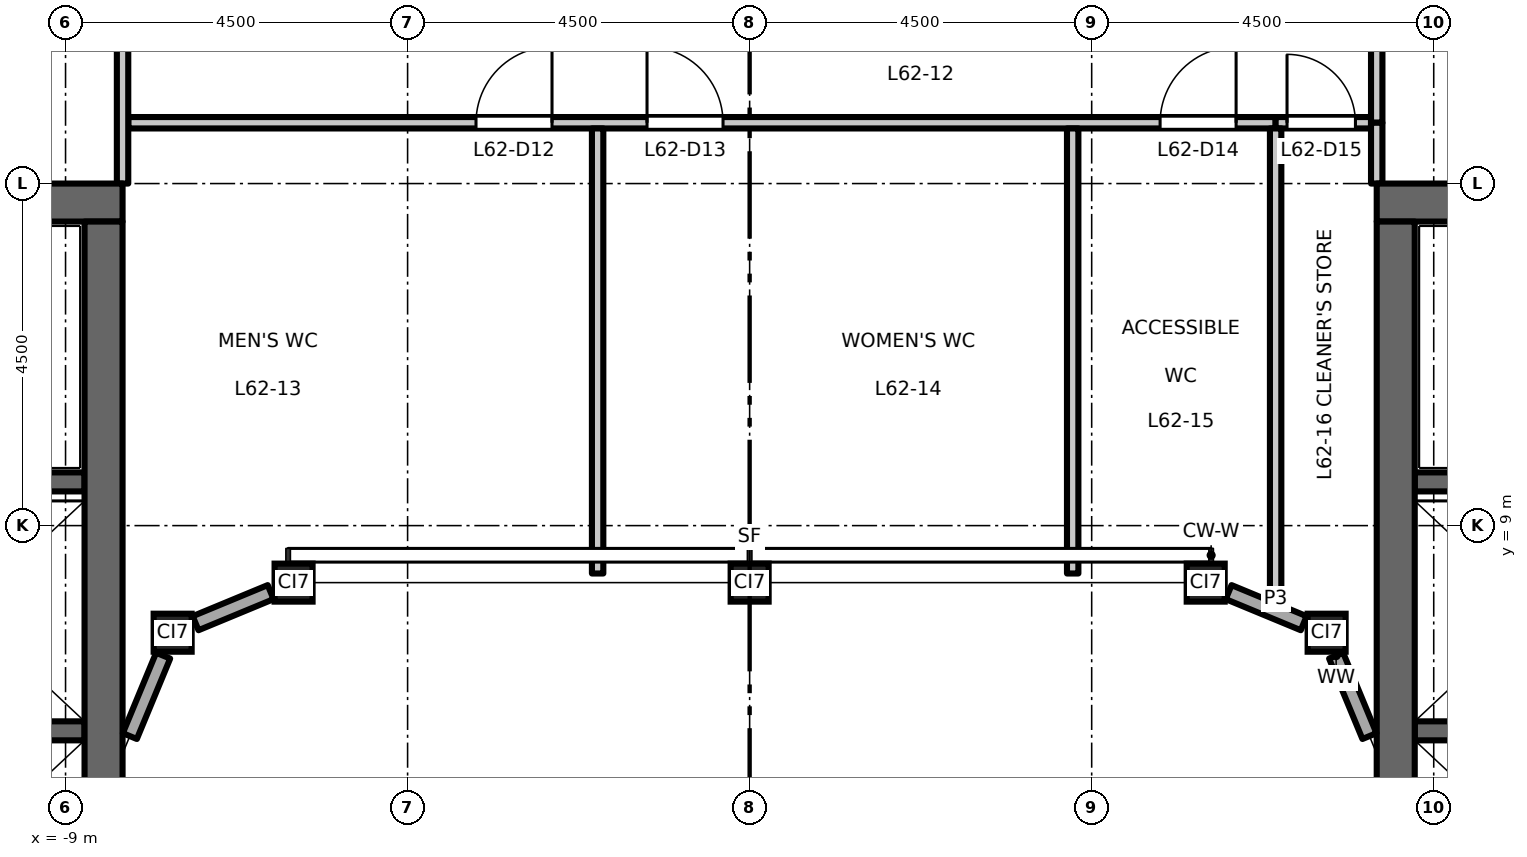
"""IFC4 building model, lengths in metres.
Left out: names, types, materials, properties, quantities, classifications, styles, units other than length and angle.
Written with IfcOpenShell. Run it as: python <this file> out.ifc"""

import sys

from ifc_helpers import new_model, si_unit, direction, frame, frame_2d, origin, origin_2d, place, context, subcontext, project, spatial, rectangle, hollow_rectangle, extrude, element, fill, save


model = new_model("IFC4")
c1 = context("Model", 3, precision=1e-05, world=origin(), true_north=direction((0.0, 1.0)))
c2 = subcontext(c1, "Body", "Model", "MODEL_VIEW")
j1 = project(units=[si_unit("LENGTHUNIT", "METRE"), si_unit("PLANEANGLEUNIT", "RADIAN")], contexts=[c1])
p1 = place(None, origin())
s1 = spatial("IfcSite", under=j1, at=p1, CompositionType="ELEMENT")
p2 = place(p1, origin())
s2 = spatial("IfcBuilding", under=s1, at=p2, CompositionType="ELEMENT")
p3 = place(p2, frame((0.0, 0.0, 289.7)))
s3 = spatial("IfcBuildingStorey", under=s2, at=p3, CompositionType="ELEMENT", Elevation=289.7)
for number, where, z_axis, x_axis in (
    (1, (-7.591, 7.591, 0.0), (0.0, 0.0, 1.0), (1.0, 0.0, 0.0)),
    (2, (-6.0, 8.25, 0.0), (0.0, 0.0, 1.0), (1.0, 0.0, 0.0)),
    (3, (0.0, 8.25, 0.0), (0.0, 0.0, 1.0), (1.0, 0.0, 0.0)),
    (4, (6.0, 8.25, 0.0), (0.0, 0.0, 1.0), (1.0, 0.0, 0.0)),
    (5, (7.591, 7.591, 0.0), (0.0, 0.0, 1.0), (1.0, 0.0, 0.0)),
):
    element("IfcColumn", number, at=place(p3, frame(where, z_axis=z_axis, x_axis=x_axis)), inside=s3, PredefinedType="COLUMN", context=c2, shape_type="SweptSolid", body=[
        extrude(hollow_rectangle(XDim=0.5, YDim=0.5, WallThickness=0.025, at=origin_2d()), origin(), (0.0, 0.0, 1.0), 4.5),
    ])
p4 = place(p3, frame((-8.75, 6.3, 0.0), z_axis=(0.0, 0.0, 1.0), x_axis=(-1.0, 0.0, 0.0)))
e6 = element("IfcWall", 6, at=p4, inside=s3, PredefinedType="SHEAR", context=c2, shape_type="SweptSolid", body=[
    extrude(rectangle(XDim=3.1, YDim=0.25, at=frame_2d((1.55, 0.0))), origin(), (0.0, 0.0, 1.0), 4.35),
])
p5 = place(p3, frame((-8.75, 9.575, 0.0), z_axis=(0.0, 0.0, 1.0), x_axis=(-1.0, 0.0, 0.0)))
e7 = element("IfcWall", 7, at=p5, inside=s3, PredefinedType="SHEAR", context=c2, shape_type="SweptSolid", body=[
    extrude(rectangle(XDim=8.0, YDim=0.25, at=frame_2d((4.0, 0.0))), origin(), (0.0, 0.0, 1.0), 4.35),
])
p6 = place(p5, frame((6.65, 0.0, 0.0)))
e8 = element("IfcOpeningElement", 8, at=p6, cuts=e7, PredefinedType="OPENING", context=c2, shape_type="SweptSolid", body=[
    extrude(rectangle(XDim=1.1, YDim=2.1, at=frame_2d((0.55, 1.05))), frame((0.0, 0.135, 0.0), z_axis=(0.0, -1.0, 0.0), x_axis=(1.0, 0.0, 0.0)), (0.0, 0.0, 1.0), 0.27),
])
p7 = place(p3, frame((-8.25, 13.25, 0.0), z_axis=(0.0, 0.0, 1.0), x_axis=(-1.0, 0.0, 0.0)))
e9 = element("IfcWall", 9, at=p7, inside=s3, PredefinedType="SHEAR", context=c2, shape_type="SweptSolid", body=[
    extrude(rectangle(XDim=9.0, YDim=0.5, at=frame_2d((4.5, 0.0))), origin(), (0.0, 0.0, 1.0), 4.35),
])
p8 = place(p3, frame((-8.5, -13.0, 0.0), z_axis=(0.0, 0.0, 1.0), x_axis=(0.0, 1.0, 0.0)))
e10 = element("IfcWall", 10, at=p8, inside=s3, PredefinedType="SHEAR", context=c2, shape_type="SweptSolid", body=[
    extrude(rectangle(XDim=26.0, YDim=0.5, at=frame_2d((13.0, 0.0))), origin(), (0.0, 0.0, 1.0), 4.35),
])
p9 = place(p3, frame((8.75, 6.3, 0.0), z_axis=(0.0, 0.0, 1.0), x_axis=(1.0, 0.0, 0.0)))
e11 = element("IfcWall", 11, at=p9, inside=s3, PredefinedType="SHEAR", context=c2, shape_type="SweptSolid", body=[
    extrude(rectangle(XDim=3.1, YDim=0.25, at=frame_2d((1.55, 0.0))), origin(), (0.0, 0.0, 1.0), 4.35),
])
p10 = place(p3, frame((8.75, 9.575, 0.0), z_axis=(0.0, 0.0, 1.0), x_axis=(1.0, 0.0, 0.0)))
e12 = element("IfcWall", 12, at=p10, inside=s3, PredefinedType="SHEAR", context=c2, shape_type="SweptSolid", body=[
    extrude(rectangle(XDim=8.0, YDim=0.25, at=frame_2d((4.0, 0.0))), origin(), (0.0, 0.0, 1.0), 4.35),
])
p11 = place(p10, frame((6.65, 0.0, 0.0)))
e13 = element("IfcOpeningElement", 13, at=p11, cuts=e12, PredefinedType="OPENING", context=c2, shape_type="SweptSolid", body=[
    extrude(rectangle(XDim=1.1, YDim=2.1, at=frame_2d((0.55, 1.05))), frame((0.0, 0.135, 0.0), z_axis=(0.0, -1.0, 0.0), x_axis=(1.0, 0.0, 0.0)), (0.0, 0.0, 1.0), 0.27),
])
p12 = place(p3, frame((8.25, 13.25, 0.0), z_axis=(0.0, 0.0, 1.0), x_axis=(1.0, 0.0, 0.0)))
e14 = element("IfcWall", 14, at=p12, inside=s3, PredefinedType="SHEAR", context=c2, shape_type="SweptSolid", body=[
    extrude(rectangle(XDim=9.0, YDim=0.5, at=frame_2d((4.5, 0.0))), origin(), (0.0, 0.0, 1.0), 4.35),
])
p13 = place(p3, frame((8.5, -13.0, 0.0), z_axis=(0.0, 0.0, 1.0), x_axis=(0.0, 1.0, 0.0)))
e15 = element("IfcWall", 15, at=p13, inside=s3, PredefinedType="SHEAR", context=c2, shape_type="SweptSolid", body=[
    extrude(rectangle(XDim=26.0, YDim=0.5, at=frame_2d((13.0, 0.0))), origin(), (0.0, 0.0, 1.0), 4.35),
])
p14 = place(p3, frame((8.154, 6.231, 0.0), z_axis=(0.0, 0.0, 1.0), x_axis=(-0.382571404949, 0.923925927829, 0.0)))
e16 = element("IfcWall", 16, at=p14, inside=s3, PredefinedType="STANDARD", context=c2, shape_type="SweptSolid", body=[
    extrude(rectangle(XDim=1.146, YDim=0.2, at=frame_2d((0.573, 0.0))), origin(), (0.0, 0.0, 1.0), 4.01),
])
for number, where, z_axis, x_axis in (
    (17, (7.289, 7.716, 0.0), (0.0, 0.0, 1.0), (-0.924, 0.383, 0.0)),
    (18, (-6.302, 8.125, 0.0), (0.0, 0.0, 1.0), (-0.924, -0.383, 0.0)),
):
    element("IfcWall", number, at=place(p3, frame(where, z_axis=z_axis, x_axis=x_axis)), inside=s3, PredefinedType="STANDARD", context=c2, shape_type="SweptSolid", body=[
        extrude(rectangle(XDim=1.069, YDim=0.2, at=frame_2d((0.534, 0.0))), origin(), (0.0, 0.0, 1.0), 4.01),
    ])
p15 = place(p3, frame((-7.716, 7.289, 0.0), z_axis=(0.0, 0.0, 1.0), x_axis=(-0.382571404949, -0.923925927829, 0.0)))
e19 = element("IfcWall", 19, at=p15, inside=s3, PredefinedType="STANDARD", context=c2, shape_type="SweptSolid", body=[
    extrude(rectangle(XDim=1.146, YDim=0.2, at=frame_2d((0.573, 0.0))), origin(), (0.0, 0.0, 1.0), 4.01),
])
p16 = place(p3, frame((-8.175, 14.3, 0.0), z_axis=(0.0, 0.0, 1.0), x_axis=(1.0, 0.0, 0.0)))
e20 = element("IfcWall", 20, at=p16, inside=s3, PredefinedType="PARTITIONING", context=c2, shape_type="SweptSolid", body=[
    extrude(rectangle(XDim=15.095, YDim=0.15, at=frame_2d((7.547, 0.0))), origin(), (0.0, 0.0, 1.0), 4.35),
])
p17 = place(p16, frame((4.575, 0.0, 0.0)))
e21 = element("IfcOpeningElement", 21, at=p17, cuts=e20, PredefinedType="OPENING", context=c2, shape_type="SweptSolid", body=[
    extrude(rectangle(XDim=1.0, YDim=2.1, at=frame_2d((0.5, 1.05))), frame((0.0, 0.085, 0.0), z_axis=(0.0, -1.0, 0.0), x_axis=(1.0, 0.0, 0.0)), (0.0, 0.0, 1.0), 0.17),
])
p18 = place(p16, frame((6.825, 0.0, 0.0)))
e22 = element("IfcOpeningElement", 22, at=p18, cuts=e20, PredefinedType="OPENING", context=c2, shape_type="SweptSolid", body=[
    extrude(rectangle(XDim=1.0, YDim=2.1, at=frame_2d((0.5, 1.05))), frame((0.0, 0.085, 0.0), z_axis=(0.0, -1.0, 0.0), x_axis=(1.0, 0.0, 0.0)), (0.0, 0.0, 1.0), 0.17),
])
p19 = place(p16, frame((13.575, 0.0, 0.0)))
e23 = element("IfcOpeningElement", 23, at=p19, cuts=e20, PredefinedType="OPENING", context=c2, shape_type="SweptSolid", body=[
    extrude(rectangle(XDim=1.0, YDim=2.1, at=frame_2d((0.5, 1.05))), frame((0.0, 0.085, 0.0), z_axis=(0.0, -1.0, 0.0), x_axis=(1.0, 0.0, 0.0)), (0.0, 0.0, 1.0), 0.17),
])
p20 = place(p3, frame((6.92, 14.3, 0.0), z_axis=(0.0, 0.0, 1.0), x_axis=(1.0, 0.0, 0.0)))
e24 = element("IfcWall", 24, at=p20, inside=s3, PredefinedType="PARTITIONING", context=c2, shape_type="SweptSolid", body=[
    extrude(rectangle(XDim=1.255, YDim=0.15, at=frame_2d((0.627, 0.0))), origin(), (0.0, 0.0, 1.0), 4.35),
])
p21 = place(p20, frame((0.15, 0.0, 0.0)))
e25 = element("IfcOpeningElement", 25, at=p21, cuts=e24, PredefinedType="OPENING", context=c2, shape_type="SweptSolid", body=[
    extrude(rectangle(XDim=0.9, YDim=2.1, at=frame_2d((0.45, 1.05))), frame((0.0, 0.085, 0.0), z_axis=(0.0, -1.0, 0.0), x_axis=(1.0, 0.0, 0.0)), (0.0, 0.0, 1.0), 0.17),
])
p22 = place(p3, frame((-8.25, 13.5, 0.0), z_axis=(0.0, 0.0, 1.0), x_axis=(0.0, 1.0, 0.0)))
e26 = element("IfcWall", 26, at=p22, inside=s3, PredefinedType="PARTITIONING", context=c2, shape_type="SweptSolid", body=[
    extrude(rectangle(XDim=2.925, YDim=0.15, at=frame_2d((1.462, 0.0))), origin(), (0.0, 0.0, 1.0), 4.35),
])
for number, where, z_axis, x_axis in (
    (27, (-2.0, 8.37, 0.0), (0.0, 0.0, 1.0), (0.0, 1.0, 0.0)),
    (28, (4.25, 8.37, 0.0), (0.0, 0.0, 1.0), (0.0, 1.0, 0.0)),
):
    element("IfcWall", number, at=place(p3, frame(where, z_axis=z_axis, x_axis=x_axis)), inside=s3, PredefinedType="PARTITIONING", context=c2, shape_type="SweptSolid", body=[
        extrude(rectangle(XDim=5.855, YDim=0.15, at=frame_2d((2.927, 0.0))), origin(), (0.0, 0.0, 1.0), 4.35),
    ])
p23 = place(p3, frame((6.92, 8.029, 0.0), z_axis=(0.0, 0.0, 1.0), x_axis=(0.0, 1.0, 0.0)))
e29 = element("IfcWall", 29, at=p23, inside=s3, PredefinedType="PARTITIONING", context=c2, shape_type="SweptSolid", body=[
    extrude(rectangle(XDim=6.196, YDim=0.15, at=frame_2d((3.098, 0.0))), origin(), (0.0, 0.0, 1.0), 4.35),
])
p24 = place(p3, frame((8.25, 14.3, 0.0), z_axis=(0.0, 0.0, 1.0), x_axis=(0.0, 1.0, 0.0)))
e30 = element("IfcWall", 30, at=p24, inside=s3, PredefinedType="PARTITIONING", context=c2, shape_type="SweptSolid", body=[
    extrude(rectangle(XDim=2.125, YDim=0.15, at=frame_2d((1.062, 0.0))), origin(), (0.0, 0.0, 1.0), 4.35),
])
p25 = place(p3, frame((8.25, 13.5, 0.0), z_axis=(0.0, 0.0, 1.0), x_axis=(0.0, 1.0, 0.0)))
e31 = element("IfcWall", 31, at=p25, inside=s3, PredefinedType="PARTITIONING", context=c2, shape_type="SweptSolid", body=[
    extrude(rectangle(XDim=0.8, YDim=0.15, at=frame_2d((0.4, 0.0))), origin(), (0.0, 0.0, 1.0), 4.35),
])
p26 = place(p17, origin())
e32 = element("IfcDoor", 32, at=p26, inside=s3, OperationType="SINGLE_SWING_RIGHT", PredefinedType="DOOR", context=c2, shape_type="SweptSolid", body=[
    extrude(rectangle(XDim=1.0, YDim=2.1, at=frame_2d((0.5, 1.05))), frame((0.0, 0.025, 0.0), z_axis=(0.0, -1.0, 0.0), x_axis=(1.0, 0.0, 0.0)), (0.0, 0.0, 1.0), 0.05),
])
fill(e21, e32)
p27 = place(p18, origin())
e33 = element("IfcDoor", 33, at=p27, inside=s3, OperationType="SINGLE_SWING_LEFT", PredefinedType="DOOR", context=c2, shape_type="SweptSolid", body=[
    extrude(rectangle(XDim=1.0, YDim=2.1, at=frame_2d((0.5, 1.05))), frame((0.0, 0.025, 0.0), z_axis=(0.0, -1.0, 0.0), x_axis=(1.0, 0.0, 0.0)), (0.0, 0.0, 1.0), 0.05),
])
fill(e22, e33)
p28 = place(p19, origin())
e34 = element("IfcDoor", 34, at=p28, inside=s3, OperationType="SINGLE_SWING_RIGHT", PredefinedType="DOOR", context=c2, shape_type="SweptSolid", body=[
    extrude(rectangle(XDim=1.0, YDim=2.1, at=frame_2d((0.5, 1.05))), frame((0.0, 0.025, 0.0), z_axis=(0.0, -1.0, 0.0), x_axis=(1.0, 0.0, 0.0)), (0.0, 0.0, 1.0), 0.05),
])
fill(e23, e34)
p29 = place(p21, origin())
e35 = element("IfcDoor", 35, at=p29, inside=s3, OperationType="SINGLE_SWING_LEFT", PredefinedType="DOOR", context=c2, shape_type="SweptSolid", body=[
    extrude(rectangle(XDim=0.9, YDim=2.1, at=frame_2d((0.45, 1.05))), frame((0.0, 0.025, 0.0), z_axis=(0.0, -1.0, 0.0), x_axis=(1.0, 0.0, 0.0)), (0.0, 0.0, 1.0), 0.05),
])
fill(e25, e35)
save(model, sys.argv[1])
